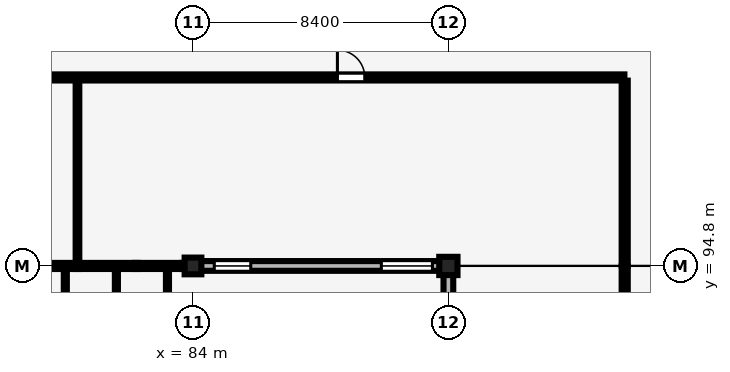
"""IFC4 building model, lengths in metres.
Left out: names, types, materials, properties, quantities, classifications, styles, units other than length and angle.
Written with IfcOpenShell. Run it as: python <this file> out.ifc"""

import sys

from ifc_helpers import new_model, si_unit, direction, frame, frame_2d, origin, origin_2d, place, context, subcontext, project, spatial, rectangle, extrude, element, fill, save


model = new_model("IFC4")
c1 = context("Model", 3, precision=1e-05, world=origin(), true_north=direction((0.0, 1.0)))
c2 = subcontext(c1, "Body", "Model", "MODEL_VIEW")
j1 = project(units=[si_unit("LENGTHUNIT", "METRE"), si_unit("PLANEANGLEUNIT", "RADIAN")], contexts=[c1])
p1 = place(None, origin())
s1 = spatial("IfcSite", under=j1, at=p1, CompositionType="ELEMENT")
p2 = place(p1, origin())
s2 = spatial("IfcBuilding", under=s1, at=p2, CompositionType="ELEMENT")
p3 = place(p2, frame((0.0, 0.0, 9.0)))
s3 = spatial("IfcBuildingStorey", under=s2, at=p3, CompositionType="ELEMENT", Elevation=9.0)
p4 = place(p3, frame((84.0, 94.8, 0.0), z_axis=(0.0, 0.0, 1.0), x_axis=(1.0, 0.0, 0.0)))
e1 = element("IfcColumn", 1, at=p4, inside=s3, PredefinedType="COLUMN", context=c2, shape_type="SweptSolid", body=[
    extrude(rectangle(XDim=0.55, YDim=0.55, at=origin_2d()), origin(), (0.0, 0.0, 1.0), 4.2),
])
p5 = place(p3, frame((92.4, 94.8, 0.0), z_axis=(0.0, 0.0, 1.0), x_axis=(1.0, 0.0, 0.0)))
e2 = element("IfcColumn", 2, at=p5, inside=s3, PredefinedType="COLUMN", context=c2, shape_type="SweptSolid", body=[
    extrude(rectangle(XDim=0.6, YDim=0.6, at=origin_2d()), origin(), (0.0, 0.0, 1.0), 4.2),
])
p6 = place(p3, frame((84.25, 94.8, 0.0), z_axis=(0.0, 0.0, 1.0), x_axis=(1.0, 0.0, 0.0)))
e3 = element("IfcWall", 3, at=p6, inside=s3, PredefinedType="SOLIDWALL", context=c2, shape_type="SweptSolid", body=[
    extrude(rectangle(XDim=7.875, YDim=0.32, at=frame_2d((3.938, 0.0))), origin(), (0.0, 0.0, 1.0), 3.31),
])
p7 = place(p6, frame((0.45, 0.0, 0.9)))
e4 = element("IfcOpeningElement", 4, at=p7, cuts=e3, PredefinedType="OPENING", context=c2, shape_type="SweptSolid", body=[
    extrude(rectangle(XDim=1.2, YDim=1.8, at=frame_2d((0.6, 0.9))), frame((0.0, 0.17, 0.0), z_axis=(0.0, -1.0, 0.0), x_axis=(1.0, 0.0, 0.0)), (0.0, 0.0, 1.0), 0.34),
])
p8 = place(p6, frame((5.945, 0.0, 0.9)))
e5 = element("IfcOpeningElement", 5, at=p8, cuts=e3, PredefinedType="OPENING", context=c2, shape_type="SweptSolid", body=[
    extrude(rectangle(XDim=1.68, YDim=2.26, at=frame_2d((0.84, 1.13))), frame((0.0, 0.17, 0.0), z_axis=(0.0, -1.0, 0.0), x_axis=(1.0, 0.0, 0.0)), (0.0, 0.0, 1.0), 0.34),
])
p9 = place(p3, frame((92.4, 86.075, 0.0), z_axis=(0.0, 0.0, 1.0), x_axis=(0.0, 1.0, 0.0)))
e6 = element("IfcWall", 6, at=p9, inside=s3, PredefinedType="SOLIDWALL", context=c2, shape_type="SweptSolid", body=[
    extrude(rectangle(XDim=8.45, YDim=0.32, at=frame_2d((4.225, 0.0))), origin(), (0.0, 0.0, 1.0), 3.29),
])
p10 = place(p9, frame((3.025, 0.0, 0.9)))
e7 = element("IfcOpeningElement", 7, at=p10, cuts=e6, PredefinedType="OPENING", context=c2, shape_type="SweptSolid", body=[
    extrude(rectangle(XDim=2.4, YDim=1.8, at=frame_2d((1.2, 0.9))), frame((0.0, 0.17, 0.0), z_axis=(0.0, -1.0, 0.0), x_axis=(1.0, 0.0, 0.0)), (0.0, 0.0, 1.0), 0.34),
])
p11 = place(p3, frame((80.2, 94.905, 0.0), z_axis=(0.0, 0.0, 1.0), x_axis=(0.0, 1.0, 0.0)))
e8 = element("IfcWall", 8, at=p11, inside=s3, PredefinedType="PARTITIONING", context=c2, shape_type="SweptSolid", body=[
    extrude(rectangle(XDim=5.99, YDim=0.12, at=frame_2d((2.995, 0.0))), origin(), (0.0, 0.0, 1.0), 3.9),
])
p12 = place(p3, frame((62.31, 101.0, 0.0), z_axis=(0.0, 0.0, 1.0), x_axis=(1.0, 0.0, 0.0)))
e9 = element("IfcWall", 9, at=p12, inside=s3, PredefinedType="PARTITIONING", context=c2, shape_type="SweptSolid", body=[
    extrude(rectangle(XDim=35.88, YDim=0.2, at=frame_2d((17.94, 0.0))), origin(), (0.0, 0.0, 1.0), 3.48),
])
p13 = place(p12, frame((8.49, 0.0, 0.0)))
e10 = element("IfcOpeningElement", 10, at=p13, cuts=e9, PredefinedType="OPENING", context=c2, shape_type="SweptSolid", body=[
    extrude(rectangle(XDim=0.9, YDim=2.1, at=frame_2d((0.45, 1.05))), frame((0.0, 0.11, 0.0), z_axis=(0.0, -1.0, 0.0), x_axis=(1.0, 0.0, 0.0)), (0.0, 0.0, 1.0), 0.22),
])
p14 = place(p12, frame((26.44, 0.0, 0.0)))
e11 = element("IfcOpeningElement", 11, at=p14, cuts=e9, PredefinedType="OPENING", context=c2, shape_type="SweptSolid", body=[
    extrude(rectangle(XDim=0.9, YDim=2.1, at=frame_2d((0.45, 1.05))), frame((0.0, 0.11, 0.0), z_axis=(0.0, -1.0, 0.0), x_axis=(1.0, 0.0, 0.0)), (0.0, 0.0, 1.0), 0.22),
])
p15 = place(p3, frame((98.2, 94.81, 0.0), z_axis=(0.0, 0.0, 1.0), x_axis=(0.0, 1.0, 0.0)))
e12 = element("IfcWall", 12, at=p15, inside=s3, PredefinedType="PARTITIONING", context=c2, shape_type="SweptSolid", body=[
    extrude(rectangle(XDim=6.085, YDim=0.2, at=frame_2d((3.042, 0.0))), origin(), (0.0, 0.0, 1.0), 3.9),
])
p16 = place(p3, frame((98.2, 85.81, 0.0), z_axis=(0.0, 0.0, 1.0), x_axis=(0.0, 1.0, 0.0)))
e13 = element("IfcWall", 13, at=p16, inside=s3, PredefinedType="PARTITIONING", context=c2, shape_type="SweptSolid", body=[
    extrude(rectangle(XDim=8.98, YDim=0.2, at=frame_2d((4.49, 0.0))), origin(), (0.0, 0.0, 1.0), 3.9),
])
p17 = place(p16, frame((3.99, 0.0, 0.0)))
e14 = element("IfcOpeningElement", 14, at=p17, cuts=e13, PredefinedType="OPENING", context=c2, shape_type="SweptSolid", body=[
    extrude(rectangle(XDim=1.0, YDim=2.15, at=frame_2d((0.5, 1.075))), frame((0.0, 0.11, 0.0), z_axis=(0.0, -1.0, 0.0), x_axis=(1.0, 0.0, 0.0)), (0.0, 0.0, 1.0), 0.22),
])
p18 = place(p7, origin())
e15 = element("IfcWindow", 15, at=p18, inside=s3, PartitioningType="SINGLE_PANEL", PredefinedType="WINDOW", context=c2, shape_type="SweptSolid", body=[
    extrude(rectangle(XDim=1.2, YDim=1.8, at=frame_2d((0.6, 0.9))), frame((0.0, 0.03, 0.0), z_axis=(0.0, -1.0, 0.0), x_axis=(1.0, 0.0, 0.0)), (0.0, 0.0, 1.0), 0.06),
])
fill(e4, e15)
p19 = place(p8, origin())
e16 = element("IfcWindow", 16, at=p19, inside=s3, PartitioningType="SINGLE_PANEL", PredefinedType="WINDOW", context=c2, shape_type="SweptSolid", body=[
    extrude(rectangle(XDim=1.68, YDim=2.26, at=frame_2d((0.84, 1.13))), frame((0.0, 0.03, 0.0), z_axis=(0.0, -1.0, 0.0), x_axis=(1.0, 0.0, 0.0)), (0.0, 0.0, 1.0), 0.06),
])
fill(e5, e16)
p20 = place(p14, origin())
e17 = element("IfcDoor", 17, at=p20, inside=s3, OperationType="SINGLE_SWING_LEFT", PredefinedType="DOOR", context=c2, shape_type="SweptSolid", body=[
    extrude(rectangle(XDim=0.9, YDim=2.1, at=frame_2d((0.45, 1.05))), frame((0.0, 0.025, 0.0), z_axis=(0.0, -1.0, 0.0), x_axis=(1.0, 0.0, 0.0)), (0.0, 0.0, 1.0), 0.05),
])
fill(e11, e17)
save(model, sys.argv[1])
